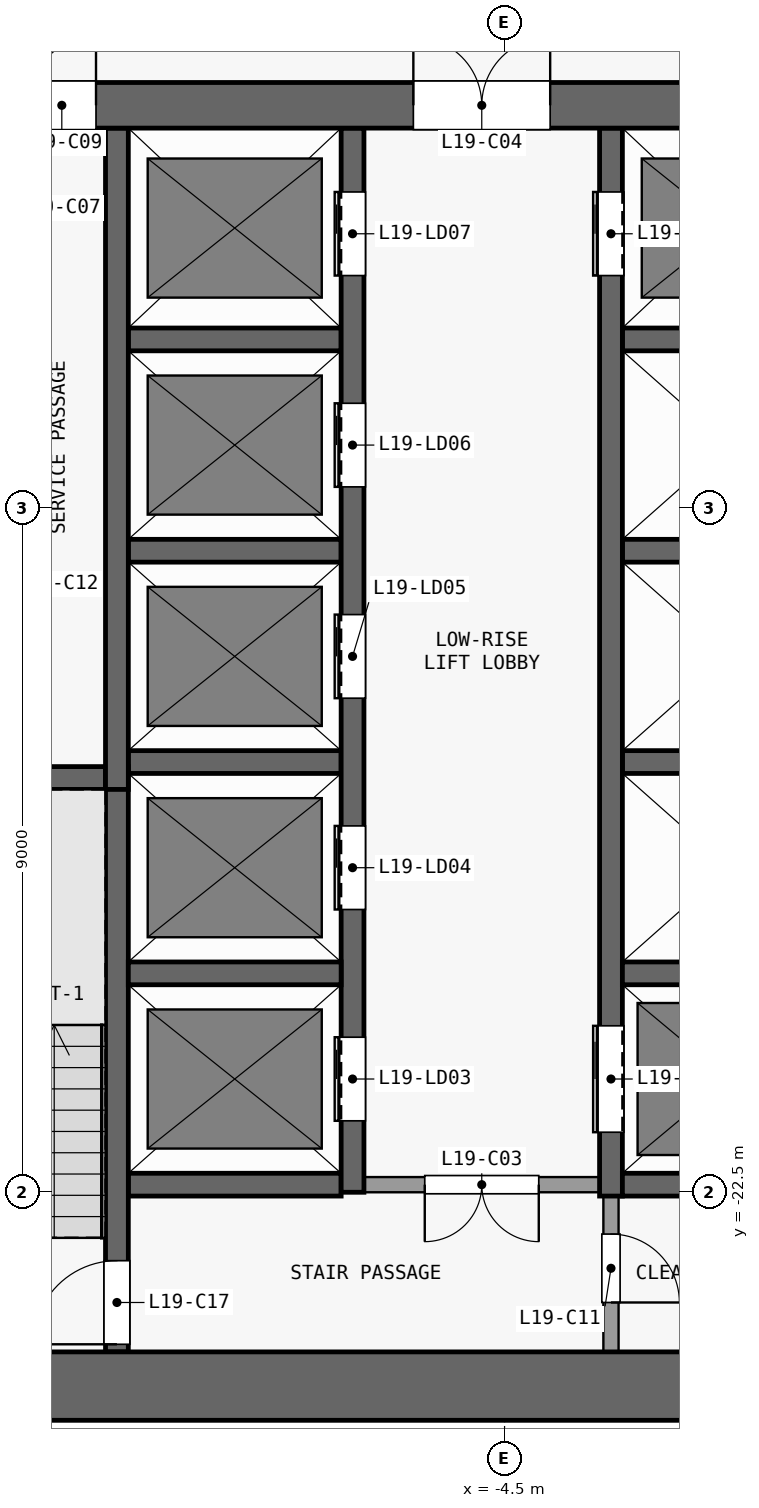
"""IFC4 building model, lengths in metres.
Left out: names, types, materials, properties, quantities, classifications, styles, units other than length and angle.
Written with IfcOpenShell. Run it as: python <this file> out.ifc"""

import sys

from ifc_helpers import new_model, si_unit, direction, frame, frame_2d, origin, place, context, subcontext, project, spatial, rectangle, extrude, element, fill, save


model = new_model("IFC4")
c1 = context("Model", 3, precision=1e-05, world=origin(), true_north=direction((0.0, 1.0)))
c2 = subcontext(c1, "Body", "Model", "MODEL_VIEW")
j1 = project(units=[si_unit("LENGTHUNIT", "METRE"), si_unit("PLANEANGLEUNIT", "RADIAN")], contexts=[c1])
p1 = place(None, origin())
s1 = spatial("IfcSite", under=j1, at=p1, CompositionType="ELEMENT")
p2 = place(p1, origin())
s2 = spatial("IfcBuilding", under=s1, at=p2, CompositionType="ELEMENT")
p3 = place(p2, frame((0.0, 0.0, 81.1)))
s3 = spatial("IfcBuildingStorey", under=s2, at=p3, CompositionType="ELEMENT", Elevation=81.1)
p4 = place(p3, frame((-13.4, -25.05, 0.0), z_axis=(0.0, 0.0, 1.0), x_axis=(1.0, 0.0, 0.0)))
e1 = element("IfcWall", 1, at=p4, inside=s3, PredefinedType="SHEAR", context=c2, shape_type="SweptSolid", body=[
    extrude(rectangle(XDim=26.8, YDim=0.9, at=frame_2d((13.4, 0.0))), origin(), (0.0, 0.0, 1.0), 3.3),
])
p5 = place(p3, frame((-13.4, -8.2, 0.0), z_axis=(0.0, 0.0, 1.0), x_axis=(1.0, 0.0, 0.0)))
e2 = element("IfcWall", 2, at=p5, inside=s3, PredefinedType="SHEAR", context=c2, shape_type="SweptSolid", body=[
    extrude(rectangle(XDim=26.8, YDim=0.6, at=frame_2d((13.4, 0.0))), origin(), (0.0, 0.0, 1.0), 3.3),
])
p6 = place(p5, frame((7.7, 0.0, 0.0)))
e3 = element("IfcOpeningElement", 3, at=p6, cuts=e2, PredefinedType="OPENING", context=c2, shape_type="SweptSolid", body=[
    extrude(rectangle(XDim=1.8, YDim=2.1, at=frame_2d((0.9, 1.05))), frame((0.0, 0.31, 0.0), z_axis=(0.0, -1.0, 0.0), x_axis=(1.0, 0.0, 0.0)), (0.0, 0.0, 1.0), 0.62),
])
p7 = place(p5, frame((17.3, 0.0, 0.0)))
e4 = element("IfcOpeningElement", 4, at=p7, cuts=e2, PredefinedType="OPENING", context=c2, shape_type="SweptSolid", body=[
    extrude(rectangle(XDim=1.8, YDim=2.1, at=frame_2d((0.9, 1.05))), frame((0.0, 0.31, 0.0), z_axis=(0.0, -1.0, 0.0), x_axis=(1.0, 0.0, 0.0)), (0.0, 0.0, 1.0), 0.62),
])
p8 = place(p5, frame((2.625, 0.0, 0.0)))
e5 = element("IfcOpeningElement", 5, at=p8, cuts=e2, PredefinedType="OPENING", context=c2, shape_type="SweptSolid", body=[
    extrude(rectangle(XDim=0.9, YDim=2.1, at=frame_2d((0.45, 1.05))), frame((0.0, 0.31, 0.0), z_axis=(0.0, -1.0, 0.0), x_axis=(1.0, 0.0, 0.0)), (0.0, 0.0, 1.0), 0.62),
])
p9 = place(p5, frame((23.275, 0.0, 0.0)))
e6 = element("IfcOpeningElement", 6, at=p9, cuts=e2, PredefinedType="OPENING", context=c2, shape_type="SweptSolid", body=[
    extrude(rectangle(XDim=0.9, YDim=2.1, at=frame_2d((0.45, 1.05))), frame((0.0, 0.31, 0.0), z_axis=(0.0, -1.0, 0.0), x_axis=(1.0, 0.0, 0.0)), (0.0, 0.0, 1.0), 0.62),
])
p10 = place(p3, frame((-9.45, -22.4, 0.0), z_axis=(0.0, 0.0, 1.0), x_axis=(1.0, 0.0, 0.0)))
e7 = element("IfcWall", 7, at=p10, inside=s3, PredefinedType="SHEAR", context=c2, shape_type="SweptSolid", body=[
    extrude(rectangle(XDim=2.8, YDim=0.3, at=frame_2d((1.4, 0.0))), origin(), (0.0, 0.0, 1.0), 3.3),
])
p11 = place(p3, frame((-3.25, -22.4, 0.0), z_axis=(0.0, 0.0, 1.0), x_axis=(-1.0, 0.0, 0.0)))
e8 = element("IfcWall", 8, at=p11, inside=s3, PredefinedType="PARTITIONING", context=c2, shape_type="SweptSolid", body=[
    extrude(rectangle(XDim=3.1, YDim=0.2, at=frame_2d((1.55, 0.0))), origin(), (0.0, 0.0, 1.0), 3.3),
])
p12 = place(p11, frame((0.8, 0.0, 0.0)))
e9 = element("IfcOpeningElement", 9, at=p12, cuts=e8, PredefinedType="OPENING", context=c2, shape_type="SweptSolid", body=[
    extrude(rectangle(XDim=1.5, YDim=2.1, at=frame_2d((0.75, 1.05))), frame((0.0, 0.11, 0.0), z_axis=(0.0, -1.0, 0.0), x_axis=(1.0, 0.0, 0.0)), (0.0, 0.0, 1.0), 0.22),
])
p13 = place(p3, frame((-2.95, -22.4, 0.0), z_axis=(0.0, 0.0, 1.0), x_axis=(1.0, 0.0, 0.0)))
e10 = element("IfcWall", 10, at=p13, inside=s3, PredefinedType="SHEAR", context=c2, shape_type="SweptSolid", body=[
    extrude(rectangle(XDim=6.2, YDim=0.3, at=frame_2d((3.1, 0.0))), origin(), (0.0, 0.0, 1.0), 3.3),
])
for number, where, z_axis, x_axis in (
    (11, (-9.45, -19.62, 0.0), (0.0, 0.0, 1.0), (1.0, 0.0, 0.0)),
    (12, (-2.95, -19.62, 0.0), (0.0, 0.0, 1.0), (1.0, 0.0, 0.0)),
):
    element("IfcWall", number, at=place(p3, frame(where, z_axis=z_axis, x_axis=x_axis)), inside=s3, PredefinedType="SHEAR", context=c2, shape_type="SweptSolid", body=[
        extrude(rectangle(XDim=2.8, YDim=0.3, at=frame_2d((1.4, 0.0))), origin(), (0.0, 0.0, 1.0), 3.3),
    ])
p14 = place(p3, frame((-12.6, -17.05, 0.0), z_axis=(0.0, 0.0, 1.0), x_axis=(1.0, 0.0, 0.0)))
e13 = element("IfcWall", 13, at=p14, inside=s3, PredefinedType="SHEAR", context=c2, shape_type="SweptSolid", body=[
    extrude(rectangle(XDim=2.85, YDim=0.3, at=frame_2d((1.425, 0.0))), origin(), (0.0, 0.0, 1.0), 3.3),
])
for number, where, z_axis, x_axis in (
    (14, (-9.45, -16.84, 0.0), (0.0, 0.0, 1.0), (1.0, 0.0, 0.0)),
    (15, (-2.95, -16.84, 0.0), (0.0, 0.0, 1.0), (1.0, 0.0, 0.0)),
    (16, (-9.45, -14.06, 0.0), (0.0, 0.0, 1.0), (1.0, 0.0, 0.0)),
    (17, (-2.95, -14.06, 0.0), (0.0, 0.0, 1.0), (1.0, 0.0, 0.0)),
    (18, (-9.45, -11.28, 0.0), (0.0, 0.0, 1.0), (1.0, 0.0, 0.0)),
    (19, (-2.95, -11.28, 0.0), (0.0, 0.0, 1.0), (1.0, 0.0, 0.0)),
):
    element("IfcWall", number, at=place(p3, frame(where, z_axis=z_axis, x_axis=x_axis)), inside=s3, PredefinedType="SHEAR", context=c2, shape_type="SweptSolid", body=[
        extrude(rectangle(XDim=2.8, YDim=0.3, at=frame_2d((1.4, 0.0))), origin(), (0.0, 0.0, 1.0), 3.3),
    ])
p15 = place(p3, frame((-9.6, -24.6, 0.0), z_axis=(0.0, 0.0, 1.0), x_axis=(0.0, 1.0, 0.0)))
e20 = element("IfcWall", 20, at=p15, inside=s3, PredefinedType="SHEAR", context=c2, shape_type="SweptSolid", body=[
    extrude(rectangle(XDim=7.7, YDim=0.3, at=frame_2d((3.85, 0.0))), origin(), (0.0, 0.0, 1.0), 3.3),
])
p16 = place(p15, frame((0.1, 0.0, 0.0)))
e21 = element("IfcOpeningElement", 21, at=p16, cuts=e20, PredefinedType="OPENING", context=c2, shape_type="SweptSolid", body=[
    extrude(rectangle(XDim=1.1, YDim=2.1, at=frame_2d((0.55, 1.05))), frame((0.0, 0.16, 0.0), z_axis=(0.0, -1.0, 0.0), x_axis=(1.0, 0.0, 0.0)), (0.0, 0.0, 1.0), 0.32),
])
p17 = place(p3, frame((-9.6, -17.2, 0.0), z_axis=(0.0, 0.0, 1.0), x_axis=(0.0, 1.0, 0.0)))
e22 = element("IfcWall", 22, at=p17, inside=s3, PredefinedType="SHEAR", context=c2, shape_type="SweptSolid", body=[
    extrude(rectangle(XDim=8.7, YDim=0.3, at=frame_2d((4.35, 0.0))), origin(), (0.0, 0.0, 1.0), 3.3),
])
p18 = place(p3, frame((-6.5, -22.5, 0.0), z_axis=(0.0, 0.0, 1.0), x_axis=(0.0, 1.0, 0.0)))
e23 = element("IfcWall", 23, at=p18, inside=s3, PredefinedType="SHEAR", context=c2, shape_type="SweptSolid", body=[
    extrude(rectangle(XDim=14.0, YDim=0.3, at=frame_2d((7.0, 0.0))), origin(), (0.0, 0.0, 1.0), 3.3),
])
p19 = place(p18, frame((0.94, 0.0, 0.0)))
e24 = element("IfcOpeningElement", 24, at=p19, cuts=e23, PredefinedType="OPENING", context=c2, shape_type="SweptSolid", body=[
    extrude(rectangle(XDim=1.1, YDim=2.1, at=frame_2d((0.55, 1.05))), frame((0.0, 0.16, 0.0), z_axis=(0.0, -1.0, 0.0), x_axis=(1.0, 0.0, 0.0)), (0.0, 0.0, 1.0), 0.32),
])
p20 = place(p18, frame((3.72, 0.0, 0.0)))
e25 = element("IfcOpeningElement", 25, at=p20, cuts=e23, PredefinedType="OPENING", context=c2, shape_type="SweptSolid", body=[
    extrude(rectangle(XDim=1.1, YDim=2.1, at=frame_2d((0.55, 1.05))), frame((0.0, 0.16, 0.0), z_axis=(0.0, -1.0, 0.0), x_axis=(1.0, 0.0, 0.0)), (0.0, 0.0, 1.0), 0.32),
])
p21 = place(p18, frame((6.5, 0.0, 0.0)))
e26 = element("IfcOpeningElement", 26, at=p21, cuts=e23, PredefinedType="OPENING", context=c2, shape_type="SweptSolid", body=[
    extrude(rectangle(XDim=1.1, YDim=2.1, at=frame_2d((0.55, 1.05))), frame((0.0, 0.16, 0.0), z_axis=(0.0, -1.0, 0.0), x_axis=(1.0, 0.0, 0.0)), (0.0, 0.0, 1.0), 0.32),
])
p22 = place(p18, frame((9.28, 0.0, 0.0)))
e27 = element("IfcOpeningElement", 27, at=p22, cuts=e23, PredefinedType="OPENING", context=c2, shape_type="SweptSolid", body=[
    extrude(rectangle(XDim=1.1, YDim=2.1, at=frame_2d((0.55, 1.05))), frame((0.0, 0.16, 0.0), z_axis=(0.0, -1.0, 0.0), x_axis=(1.0, 0.0, 0.0)), (0.0, 0.0, 1.0), 0.32),
])
p23 = place(p18, frame((12.06, 0.0, 0.0)))
e28 = element("IfcOpeningElement", 28, at=p23, cuts=e23, PredefinedType="OPENING", context=c2, shape_type="SweptSolid", body=[
    extrude(rectangle(XDim=1.1, YDim=2.1, at=frame_2d((0.55, 1.05))), frame((0.0, 0.16, 0.0), z_axis=(0.0, -1.0, 0.0), x_axis=(1.0, 0.0, 0.0)), (0.0, 0.0, 1.0), 0.32),
])
p24 = place(p3, frame((-3.1, -22.55, 0.0), z_axis=(0.0, 0.0, 1.0), x_axis=(0.0, -1.0, 0.0)))
e29 = element("IfcWall", 29, at=p24, inside=s3, PredefinedType="PARTITIONING", context=c2, shape_type="SweptSolid", body=[
    extrude(rectangle(XDim=2.05, YDim=0.2, at=frame_2d((1.025, 0.0))), origin(), (0.0, 0.0, 1.0), 3.3),
])
p25 = place(p24, frame((0.5, 0.0, 0.0)))
e30 = element("IfcOpeningElement", 30, at=p25, cuts=e29, PredefinedType="OPENING", context=c2, shape_type="SweptSolid", body=[
    extrude(rectangle(XDim=0.9, YDim=2.1, at=frame_2d((0.45, 1.05))), frame((0.0, 0.11, 0.0), z_axis=(0.0, -1.0, 0.0), x_axis=(1.0, 0.0, 0.0)), (0.0, 0.0, 1.0), 0.22),
])
p26 = place(p3, frame((-3.1, -22.55, 0.0), z_axis=(0.0, 0.0, 1.0), x_axis=(0.0, 1.0, 0.0)))
e31 = element("IfcWall", 31, at=p26, inside=s3, PredefinedType="SHEAR", context=c2, shape_type="SweptSolid", body=[
    extrude(rectangle(XDim=14.05, YDim=0.3, at=frame_2d((7.025, 0.0))), origin(), (0.0, 0.0, 1.0), 3.3),
])
p27 = place(p26, frame((12.11, 0.0, 0.0)))
e32 = element("IfcOpeningElement", 32, at=p27, cuts=e31, PredefinedType="OPENING", context=c2, shape_type="SweptSolid", body=[
    extrude(rectangle(XDim=1.1, YDim=2.1, at=frame_2d((0.55, 1.05))), frame((0.0, 0.16, 0.0), z_axis=(0.0, -1.0, 0.0), x_axis=(1.0, 0.0, 0.0)), (0.0, 0.0, 1.0), 0.32),
])
p28 = place(p26, frame((0.84, 0.0, 0.0)))
e33 = element("IfcOpeningElement", 33, at=p28, cuts=e31, PredefinedType="OPENING", context=c2, shape_type="SweptSolid", body=[
    extrude(rectangle(XDim=1.4, YDim=2.1, at=frame_2d((0.7, 1.05))), frame((0.0, 0.16, 0.0), z_axis=(0.0, -1.0, 0.0), x_axis=(1.0, 0.0, 0.0)), (0.0, 0.0, 1.0), 0.32),
])
p29 = place(p19, origin())
e34 = element("IfcDoor", 34, at=p29, inside=s3, OperationType="DOUBLE_DOOR_SLIDING", PredefinedType="DOOR", context=c2, shape_type="SweptSolid", body=[
    extrude(rectangle(XDim=1.1, YDim=2.1, at=frame_2d((0.55, 1.05))), frame((0.0, 0.025, 0.0), z_axis=(0.0, -1.0, 0.0), x_axis=(1.0, 0.0, 0.0)), (0.0, 0.0, 1.0), 0.05),
])
fill(e24, e34)
p30 = place(p20, origin())
e35 = element("IfcDoor", 35, at=p30, inside=s3, OperationType="DOUBLE_DOOR_SLIDING", PredefinedType="DOOR", context=c2, shape_type="SweptSolid", body=[
    extrude(rectangle(XDim=1.1, YDim=2.1, at=frame_2d((0.55, 1.05))), frame((0.0, 0.025, 0.0), z_axis=(0.0, -1.0, 0.0), x_axis=(1.0, 0.0, 0.0)), (0.0, 0.0, 1.0), 0.05),
])
fill(e25, e35)
p31 = place(p21, origin())
e36 = element("IfcDoor", 36, at=p31, inside=s3, OperationType="DOUBLE_DOOR_SLIDING", PredefinedType="DOOR", context=c2, shape_type="SweptSolid", body=[
    extrude(rectangle(XDim=1.1, YDim=2.1, at=frame_2d((0.55, 1.05))), frame((0.0, 0.025, 0.0), z_axis=(0.0, -1.0, 0.0), x_axis=(1.0, 0.0, 0.0)), (0.0, 0.0, 1.0), 0.05),
])
fill(e26, e36)
p32 = place(p22, origin())
e37 = element("IfcDoor", 37, at=p32, inside=s3, OperationType="DOUBLE_DOOR_SLIDING", PredefinedType="DOOR", context=c2, shape_type="SweptSolid", body=[
    extrude(rectangle(XDim=1.1, YDim=2.1, at=frame_2d((0.55, 1.05))), frame((0.0, 0.025, 0.0), z_axis=(0.0, -1.0, 0.0), x_axis=(1.0, 0.0, 0.0)), (0.0, 0.0, 1.0), 0.05),
])
fill(e27, e37)
p33 = place(p23, origin())
e38 = element("IfcDoor", 38, at=p33, inside=s3, OperationType="DOUBLE_DOOR_SLIDING", PredefinedType="DOOR", context=c2, shape_type="SweptSolid", body=[
    extrude(rectangle(XDim=1.1, YDim=2.1, at=frame_2d((0.55, 1.05))), frame((0.0, 0.025, 0.0), z_axis=(0.0, -1.0, 0.0), x_axis=(1.0, 0.0, 0.0)), (0.0, 0.0, 1.0), 0.05),
])
fill(e28, e38)
p34 = place(p27, origin())
e39 = element("IfcDoor", 39, at=p34, inside=s3, OperationType="DOUBLE_DOOR_SLIDING", PredefinedType="DOOR", context=c2, shape_type="SweptSolid", body=[
    extrude(rectangle(XDim=1.1, YDim=2.1, at=frame_2d((0.55, 1.05))), frame((0.0, 0.025, 0.0), z_axis=(0.0, -1.0, 0.0), x_axis=(1.0, 0.0, 0.0)), (0.0, 0.0, 1.0), 0.05),
])
fill(e32, e39)
p35 = place(p28, origin())
e40 = element("IfcDoor", 40, at=p35, inside=s3, OperationType="DOUBLE_DOOR_SLIDING", PredefinedType="DOOR", context=c2, shape_type="SweptSolid", body=[
    extrude(rectangle(XDim=1.4, YDim=2.1, at=frame_2d((0.7, 1.05))), frame((0.0, 0.025, 0.0), z_axis=(0.0, -1.0, 0.0), x_axis=(1.0, 0.0, 0.0)), (0.0, 0.0, 1.0), 0.05),
])
fill(e33, e40)
p36 = place(p12, origin())
e41 = element("IfcDoor", 41, at=p36, inside=s3, OperationType="DOUBLE_DOOR_SINGLE_SWING", PredefinedType="DOOR", context=c2, shape_type="SweptSolid", body=[
    extrude(rectangle(XDim=1.5, YDim=2.1, at=frame_2d((0.75, 1.05))), frame((0.0, 0.025, 0.0), z_axis=(0.0, -1.0, 0.0), x_axis=(1.0, 0.0, 0.0)), (0.0, 0.0, 1.0), 0.05),
])
fill(e9, e41)
p37 = place(p6, origin())
e42 = element("IfcDoor", 42, at=p37, inside=s3, OperationType="DOUBLE_DOOR_SINGLE_SWING", PredefinedType="DOOR", context=c2, shape_type="SweptSolid", body=[
    extrude(rectangle(XDim=1.8, YDim=2.1, at=frame_2d((0.9, 1.05))), frame((0.0, 0.025, 0.0), z_axis=(0.0, -1.0, 0.0), x_axis=(1.0, 0.0, 0.0)), (0.0, 0.0, 1.0), 0.05),
])
fill(e3, e42)
p38 = place(p8, origin())
e43 = element("IfcDoor", 43, at=p38, inside=s3, OperationType="SINGLE_SWING_RIGHT", PredefinedType="DOOR", context=c2, shape_type="SweptSolid", body=[
    extrude(rectangle(XDim=0.9, YDim=2.1, at=frame_2d((0.45, 1.05))), frame((0.0, 0.025, 0.0), z_axis=(0.0, -1.0, 0.0), x_axis=(1.0, 0.0, 0.0)), (0.0, 0.0, 1.0), 0.05),
])
fill(e5, e43)
p39 = place(p25, origin())
e44 = element("IfcDoor", 44, at=p39, inside=s3, OperationType="SINGLE_SWING_RIGHT", PredefinedType="DOOR", context=c2, shape_type="SweptSolid", body=[
    extrude(rectangle(XDim=0.9, YDim=2.1, at=frame_2d((0.45, 1.05))), frame((0.0, 0.025, 0.0), z_axis=(0.0, -1.0, 0.0), x_axis=(1.0, 0.0, 0.0)), (0.0, 0.0, 1.0), 0.05),
])
fill(e30, e44)
p40 = place(p16, origin())
e45 = element("IfcDoor", 45, at=p40, inside=s3, OperationType="SINGLE_SWING_LEFT", PredefinedType="DOOR", context=c2, shape_type="SweptSolid", body=[
    extrude(rectangle(XDim=1.1, YDim=2.1, at=frame_2d((0.55, 1.05))), frame((0.0, 0.025, 0.0), z_axis=(0.0, -1.0, 0.0), x_axis=(1.0, 0.0, 0.0)), (0.0, 0.0, 1.0), 0.05),
])
fill(e21, e45)
save(model, sys.argv[1])
